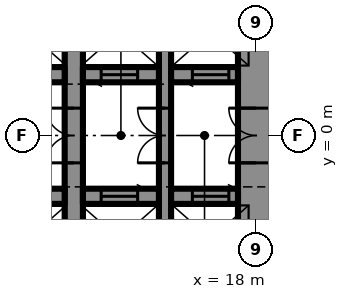
"""IFC4 building model, lengths in metres.
Left out: names, types, materials, properties, quantities, classifications, styles, units other than length and angle.
Written with IfcOpenShell. Run it as: python <this file> out.ifc"""

import sys

from ifc_helpers import new_model, si_unit, direction, frame, frame_2d, origin, place, context, subcontext, project, spatial, rectangle, extrude, element, fill, save


model = new_model("IFC4")
c1 = context("Model", 3, precision=1e-05, world=origin(), true_north=direction((0.0, 1.0)))
c2 = subcontext(c1, "Body", "Model", "MODEL_VIEW")
j1 = project(units=[si_unit("LENGTHUNIT", "METRE"), si_unit("PLANEANGLEUNIT", "RADIAN")], contexts=[c1])
p1 = place(None, origin())
s1 = spatial("IfcSite", under=j1, at=p1, CompositionType="ELEMENT")
p2 = place(p1, origin())
s2 = spatial("IfcBuilding", under=s1, at=p2, CompositionType="ELEMENT")
p3 = place(p2, origin())
s3 = spatial("IfcBuildingStorey", under=s2, at=p3, CompositionType="ELEMENT", Elevation=0.0)
p4 = place(p3, frame((18.0, -10.7, 0.0), z_axis=(0.0, 0.0, 1.0), x_axis=(0.0, 1.0, 0.0)))
e1 = element("IfcWall", 1, at=p4, inside=s3, PredefinedType="SHEAR", context=c2, shape_type="SweptSolid", body=[
    extrude(rectangle(XDim=21.4, YDim=1.2, at=frame_2d((10.7, 0.0))), origin(), (0.0, 0.0, 1.0), 7.0),
])
p5 = place(p4, frame((9.8, 0.0, 0.0)))
e2 = element("IfcOpeningElement", 2, at=p5, cuts=e1, PredefinedType="OPENING", context=c2, shape_type="SweptSolid", body=[
    extrude(rectangle(XDim=1.8, YDim=2.4, at=frame_2d((0.9, 1.2))), frame((0.0, 0.61, 0.0), z_axis=(0.0, -1.0, 0.0), x_axis=(1.0, 0.0, 0.0)), (0.0, 0.0, 1.0), 1.22),
])
p6 = place(p3, frame((12.0, -10.7, 0.0), z_axis=(0.0, 0.0, 1.0), x_axis=(0.0, 1.0, 0.0)))
e3 = element("IfcWall", 3, at=p6, inside=s3, PredefinedType="SHEAR", context=c2, shape_type="SweptSolid", body=[
    extrude(rectangle(XDim=21.4, YDim=0.6, at=frame_2d((10.7, 0.0))), origin(), (0.0, 0.0, 1.0), 7.0),
])
p7 = place(p6, frame((9.8, 0.0, 0.0)))
e4 = element("IfcOpeningElement", 4, at=p7, cuts=e3, PredefinedType="OPENING", context=c2, shape_type="SweptSolid", body=[
    extrude(rectangle(XDim=1.8, YDim=2.4, at=frame_2d((0.9, 1.2))), frame((0.0, 0.31, 0.0), z_axis=(0.0, -1.0, 0.0), x_axis=(1.0, 0.0, 0.0)), (0.0, 0.0, 1.0), 0.62),
])
p8 = place(p3, frame((15.0, -10.7, 0.0), z_axis=(0.0, 0.0, 1.0), x_axis=(0.0, 1.0, 0.0)))
e5 = element("IfcWall", 5, at=p8, inside=s3, PredefinedType="SHEAR", context=c2, shape_type="SweptSolid", body=[
    extrude(rectangle(XDim=21.4, YDim=0.4, at=frame_2d((10.7, 0.0))), origin(), (0.0, 0.0, 1.0), 7.0),
])
p9 = place(p8, frame((9.8, 0.0, 0.0)))
e6 = element("IfcOpeningElement", 6, at=p9, cuts=e5, PredefinedType="OPENING", context=c2, shape_type="SweptSolid", body=[
    extrude(rectangle(XDim=1.8, YDim=2.4, at=frame_2d((0.9, 1.2))), frame((0.0, 0.21, 0.0), z_axis=(0.0, -1.0, 0.0), x_axis=(1.0, 0.0, 0.0)), (0.0, 0.0, 1.0), 0.42),
])
p10 = place(p3, frame((-3.2, 2.0, 0.0), z_axis=(0.0, 0.0, 1.0), x_axis=(1.0, 0.0, 0.0)))
e7 = element("IfcWall", 7, at=p10, inside=s3, PredefinedType="SHEAR", context=c2, shape_type="SweptSolid", body=[
    extrude(rectangle(XDim=14.9, YDim=0.5, at=frame_2d((7.45, 0.0))), origin(), (0.0, 0.0, 1.0), 7.0),
])
p11 = place(p10, frame((1.15, 0.0, 0.0)))
e8 = element("IfcOpeningElement", 8, at=p11, cuts=e7, PredefinedType="OPENING", context=c2, shape_type="SweptSolid", body=[
    extrude(rectangle(XDim=1.1, YDim=2.2, at=frame_2d((0.55, 1.1))), frame((0.0, 0.26, 0.0), z_axis=(0.0, -1.0, 0.0), x_axis=(1.0, 0.0, 0.0)), (0.0, 0.0, 1.0), 0.52),
])
p12 = place(p10, frame((4.15, 0.0, 0.0)))
e9 = element("IfcOpeningElement", 9, at=p12, cuts=e7, PredefinedType="OPENING", context=c2, shape_type="SweptSolid", body=[
    extrude(rectangle(XDim=1.1, YDim=2.2, at=frame_2d((0.55, 1.1))), frame((0.0, 0.26, 0.0), z_axis=(0.0, -1.0, 0.0), x_axis=(1.0, 0.0, 0.0)), (0.0, 0.0, 1.0), 0.52),
])
p13 = place(p10, frame((7.15, 0.0, 0.0)))
e10 = element("IfcOpeningElement", 10, at=p13, cuts=e7, PredefinedType="OPENING", context=c2, shape_type="SweptSolid", body=[
    extrude(rectangle(XDim=1.1, YDim=2.2, at=frame_2d((0.55, 1.1))), frame((0.0, 0.26, 0.0), z_axis=(0.0, -1.0, 0.0), x_axis=(1.0, 0.0, 0.0)), (0.0, 0.0, 1.0), 0.52),
])
p14 = place(p10, frame((10.15, 0.0, 0.0)))
e11 = element("IfcOpeningElement", 11, at=p14, cuts=e7, PredefinedType="OPENING", context=c2, shape_type="SweptSolid", body=[
    extrude(rectangle(XDim=1.1, YDim=2.2, at=frame_2d((0.55, 1.1))), frame((0.0, 0.26, 0.0), z_axis=(0.0, -1.0, 0.0), x_axis=(1.0, 0.0, 0.0)), (0.0, 0.0, 1.0), 0.52),
])
p15 = place(p10, frame((13.1, 0.0, 0.0)))
e12 = element("IfcOpeningElement", 12, at=p15, cuts=e7, PredefinedType="OPENING", context=c2, shape_type="SweptSolid", body=[
    extrude(rectangle(XDim=1.2, YDim=2.2, at=frame_2d((0.6, 1.1))), frame((0.0, 0.26, 0.0), z_axis=(0.0, -1.0, 0.0), x_axis=(1.0, 0.0, 0.0)), (0.0, 0.0, 1.0), 0.52),
])
p16 = place(p3, frame((12.3, 2.0, 0.0), z_axis=(0.0, 0.0, 1.0), x_axis=(1.0, 0.0, 0.0)))
e13 = element("IfcWall", 13, at=p16, inside=s3, PredefinedType="SHEAR", context=c2, shape_type="SweptSolid", body=[
    extrude(rectangle(XDim=2.5, YDim=0.5, at=frame_2d((1.25, 0.0))), origin(), (0.0, 0.0, 1.0), 7.0),
])
p17 = place(p16, frame((0.6, 0.0, 0.0)))
e14 = element("IfcOpeningElement", 14, at=p17, cuts=e13, PredefinedType="OPENING", context=c2, shape_type="SweptSolid", body=[
    extrude(rectangle(XDim=1.2, YDim=2.2, at=frame_2d((0.6, 1.1))), frame((0.0, 0.26, 0.0), z_axis=(0.0, -1.0, 0.0), x_axis=(1.0, 0.0, 0.0)), (0.0, 0.0, 1.0), 0.52),
])
p18 = place(p3, frame((15.2, 2.0, 0.0), z_axis=(0.0, 0.0, 1.0), x_axis=(1.0, 0.0, 0.0)))
e15 = element("IfcWall", 15, at=p18, inside=s3, PredefinedType="SHEAR", context=c2, shape_type="SweptSolid", body=[
    extrude(rectangle(XDim=2.2, YDim=0.5, at=frame_2d((1.1, 0.0))), origin(), (0.0, 0.0, 1.0), 7.0),
])
p19 = place(p18, frame((0.7, 0.0, 0.0)))
e16 = element("IfcOpeningElement", 16, at=p19, cuts=e15, PredefinedType="OPENING", context=c2, shape_type="SweptSolid", body=[
    extrude(rectangle(XDim=1.2, YDim=2.2, at=frame_2d((0.6, 1.1))), frame((0.0, 0.26, 0.0), z_axis=(0.0, -1.0, 0.0), x_axis=(1.0, 0.0, 0.0)), (0.0, 0.0, 1.0), 0.52),
])
p20 = place(p3, frame((17.4, -2.0, 0.0), z_axis=(0.0, 0.0, 1.0), x_axis=(-1.0, 0.0, 0.0)))
e17 = element("IfcWall", 17, at=p20, inside=s3, PredefinedType="SHEAR", context=c2, shape_type="SweptSolid", body=[
    extrude(rectangle(XDim=2.2, YDim=0.5, at=frame_2d((1.1, 0.0))), origin(), (0.0, 0.0, 1.0), 7.0),
])
p21 = place(p20, frame((0.3, 0.0, 0.0)))
e18 = element("IfcOpeningElement", 18, at=p21, cuts=e17, PredefinedType="OPENING", context=c2, shape_type="SweptSolid", body=[
    extrude(rectangle(XDim=1.2, YDim=2.2, at=frame_2d((0.6, 1.1))), frame((0.0, 0.26, 0.0), z_axis=(0.0, -1.0, 0.0), x_axis=(1.0, 0.0, 0.0)), (0.0, 0.0, 1.0), 0.52),
])
p22 = place(p3, frame((14.8, -2.0, 0.0), z_axis=(0.0, 0.0, 1.0), x_axis=(-1.0, 0.0, 0.0)))
e19 = element("IfcWall", 19, at=p22, inside=s3, PredefinedType="SHEAR", context=c2, shape_type="SweptSolid", body=[
    extrude(rectangle(XDim=2.5, YDim=0.5, at=frame_2d((1.25, 0.0))), origin(), (0.0, 0.0, 1.0), 7.0),
])
p23 = place(p22, frame((0.7, 0.0, 0.0)))
e20 = element("IfcOpeningElement", 20, at=p23, cuts=e19, PredefinedType="OPENING", context=c2, shape_type="SweptSolid", body=[
    extrude(rectangle(XDim=1.2, YDim=2.2, at=frame_2d((0.6, 1.1))), frame((0.0, 0.26, 0.0), z_axis=(0.0, -1.0, 0.0), x_axis=(1.0, 0.0, 0.0)), (0.0, 0.0, 1.0), 0.52),
])
p24 = place(p3, frame((11.7, -2.0, 0.0), z_axis=(0.0, 0.0, 1.0), x_axis=(-1.0, 0.0, 0.0)))
e21 = element("IfcWall", 21, at=p24, inside=s3, PredefinedType="SHEAR", context=c2, shape_type="SweptSolid", body=[
    extrude(rectangle(XDim=5.9, YDim=0.5, at=frame_2d((2.95, 0.0))), origin(), (0.0, 0.0, 1.0), 7.0),
])
p25 = place(p24, frame((0.6, 0.0, 0.0)))
e22 = element("IfcOpeningElement", 22, at=p25, cuts=e21, PredefinedType="OPENING", context=c2, shape_type="SweptSolid", body=[
    extrude(rectangle(XDim=1.2, YDim=2.2, at=frame_2d((0.6, 1.1))), frame((0.0, 0.26, 0.0), z_axis=(0.0, -1.0, 0.0), x_axis=(1.0, 0.0, 0.0)), (0.0, 0.0, 1.0), 0.52),
])
p26 = place(p5, origin())
e23 = element("IfcDoor", 23, at=p26, inside=s3, OperationType="DOUBLE_DOOR_SINGLE_SWING", PredefinedType="DOOR", context=c2, shape_type="SweptSolid", body=[
    extrude(rectangle(XDim=1.8, YDim=2.4, at=frame_2d((0.9, 1.2))), frame((0.0, 0.025, 0.0), z_axis=(0.0, -1.0, 0.0), x_axis=(1.0, 0.0, 0.0)), (0.0, 0.0, 1.0), 0.05),
])
fill(e2, e23)
p27 = place(p7, origin())
e24 = element("IfcDoor", 24, at=p27, inside=s3, OperationType="DOUBLE_DOOR_SINGLE_SWING", PredefinedType="DOOR", context=c2, shape_type="SweptSolid", body=[
    extrude(rectangle(XDim=1.8, YDim=2.4, at=frame_2d((0.9, 1.2))), frame((0.0, 0.025, 0.0), z_axis=(0.0, -1.0, 0.0), x_axis=(1.0, 0.0, 0.0)), (0.0, 0.0, 1.0), 0.05),
])
fill(e4, e24)
p28 = place(p9, origin())
e25 = element("IfcDoor", 25, at=p28, inside=s3, OperationType="DOUBLE_DOOR_SINGLE_SWING", PredefinedType="DOOR", context=c2, shape_type="SweptSolid", body=[
    extrude(rectangle(XDim=1.8, YDim=2.4, at=frame_2d((0.9, 1.2))), frame((0.0, 0.025, 0.0), z_axis=(0.0, -1.0, 0.0), x_axis=(1.0, 0.0, 0.0)), (0.0, 0.0, 1.0), 0.05),
])
fill(e6, e25)
p29 = place(p17, frame((1.2, 0.0, 0.0), z_axis=(0.0, 0.0, 1.0), x_axis=(-1.0, 0.0, 0.0)))
e26 = element("IfcDoor", 26, at=p29, inside=s3, OperationType="SLIDING_TO_LEFT", PredefinedType="DOOR", context=c2, shape_type="SweptSolid", body=[
    extrude(rectangle(XDim=1.2, YDim=2.2, at=frame_2d((0.6, 1.1))), frame((0.0, 0.025, 0.0), z_axis=(0.0, -1.0, 0.0), x_axis=(1.0, 0.0, 0.0)), (0.0, 0.0, 1.0), 0.05),
])
fill(e14, e26)
p30 = place(p19, frame((1.2, 0.0, 0.0), z_axis=(0.0, 0.0, 1.0), x_axis=(-1.0, 0.0, 0.0)))
e27 = element("IfcDoor", 27, at=p30, inside=s3, OperationType="SLIDING_TO_LEFT", PredefinedType="DOOR", context=c2, shape_type="SweptSolid", body=[
    extrude(rectangle(XDim=1.2, YDim=2.2, at=frame_2d((0.6, 1.1))), frame((0.0, 0.025, 0.0), z_axis=(0.0, -1.0, 0.0), x_axis=(1.0, 0.0, 0.0)), (0.0, 0.0, 1.0), 0.05),
])
fill(e16, e27)
p31 = place(p21, frame((1.2, 0.0, 0.0), z_axis=(0.0, 0.0, 1.0), x_axis=(-1.0, 0.0, 0.0)))
e28 = element("IfcDoor", 28, at=p31, inside=s3, OperationType="SLIDING_TO_LEFT", PredefinedType="DOOR", context=c2, shape_type="SweptSolid", body=[
    extrude(rectangle(XDim=1.2, YDim=2.2, at=frame_2d((0.6, 1.1))), frame((0.0, 0.025, 0.0), z_axis=(0.0, -1.0, 0.0), x_axis=(1.0, 0.0, 0.0)), (0.0, 0.0, 1.0), 0.05),
])
fill(e18, e28)
p32 = place(p23, frame((1.2, 0.0, 0.0), z_axis=(0.0, 0.0, 1.0), x_axis=(-1.0, 0.0, 0.0)))
e29 = element("IfcDoor", 29, at=p32, inside=s3, OperationType="SLIDING_TO_LEFT", PredefinedType="DOOR", context=c2, shape_type="SweptSolid", body=[
    extrude(rectangle(XDim=1.2, YDim=2.2, at=frame_2d((0.6, 1.1))), frame((0.0, 0.025, 0.0), z_axis=(0.0, -1.0, 0.0), x_axis=(1.0, 0.0, 0.0)), (0.0, 0.0, 1.0), 0.05),
])
fill(e20, e29)
save(model, sys.argv[1])
